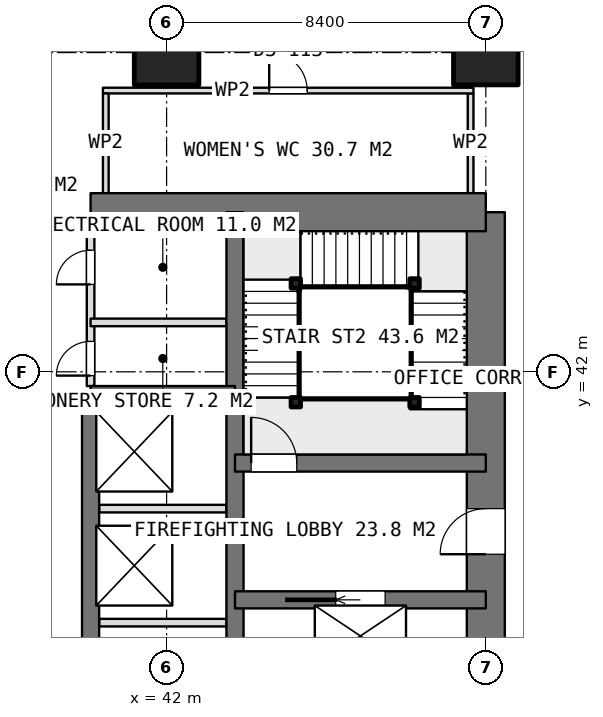
"""IFC4 building model, lengths in metres.
Left out: names, types, materials, properties, quantities, classifications, styles, units other than length and angle.
Written with IfcOpenShell. Run it as: python <this file> out.ifc"""

import sys

from ifc_helpers import new_model, si_unit, direction, frame, frame_2d, origin, origin_2d, place, context, subcontext, project, spatial, rectangle, extrude, element, fill, save


model = new_model("IFC4")
c1 = context("Model", 3, precision=1e-05, world=origin(), true_north=direction((0.0, 1.0)))
c2 = subcontext(c1, "Body", "Model", "MODEL_VIEW")
j1 = project(units=[si_unit("LENGTHUNIT", "METRE"), si_unit("PLANEANGLEUNIT", "RADIAN")], contexts=[c1])
p1 = place(None, origin())
s1 = spatial("IfcSite", under=j1, at=p1, CompositionType="ELEMENT")
p2 = place(p1, origin())
s2 = spatial("IfcBuilding", under=s1, at=p2, CompositionType="ELEMENT")
p3 = place(p2, frame((0.0, 0.0, 106.55)))
s3 = spatial("IfcBuildingStorey", under=s2, at=p3, CompositionType="ELEMENT", Elevation=106.55)
p4 = place(p3, frame((40.0, 46.2, 0.0), z_axis=(0.0, 0.0, 1.0), x_axis=(1.0, 0.0, 0.0)))
e1 = element("IfcWall", 1, at=p4, inside=s3, PredefinedType="SHEAR", context=c2, shape_type="SweptSolid", body=[
    extrude(rectangle(XDim=10.4, YDim=1.0, at=frame_2d((5.2, 0.0))), origin(), (0.0, 0.0, 1.0), 3.75),
])
p5 = place(p3, frame((50.4, 21.0, 0.0), z_axis=(0.0, 0.0, 1.0), x_axis=(0.0, 1.0, 0.0)))
e2 = element("IfcWall", 2, at=p5, inside=s3, PredefinedType="SHEAR", context=c2, shape_type="SweptSolid", body=[
    extrude(rectangle(XDim=25.2, YDim=1.0, at=frame_2d((12.6, 0.0))), origin(), (0.0, 0.0, 1.0), 3.75),
])
p6 = place(p5, frame((16.2, 0.0, 0.0)))
e3 = element("IfcOpeningElement", 3, at=p6, cuts=e2, PredefinedType="OPENING", context=c2, shape_type="SweptSolid", body=[
    extrude(rectangle(XDim=1.2, YDim=2.1, at=frame_2d((0.6, 1.05))), frame((0.0, 0.51, 0.0), z_axis=(0.0, -1.0, 0.0), x_axis=(1.0, 0.0, 0.0)), (0.0, 0.0, 1.0), 1.02),
])
p7 = place(p5, frame((10.05, 0.0, 0.0)))
e4 = element("IfcOpeningElement", 4, at=p7, cuts=e2, PredefinedType="OPENING", context=c2, shape_type="SweptSolid", body=[
    extrude(rectangle(XDim=0.9, YDim=2.1, at=frame_2d((0.45, 1.05))), frame((0.0, 0.51, 0.0), z_axis=(0.0, -1.0, 0.0), x_axis=(1.0, 0.0, 0.0)), (0.0, 0.0, 1.0), 1.02),
])
p8 = place(p5, frame((7.45, 0.0, 0.0)))
e5 = element("IfcOpeningElement", 5, at=p8, cuts=e2, PredefinedType="OPENING", context=c2, shape_type="SweptSolid", body=[
    extrude(rectangle(XDim=0.9, YDim=2.1, at=frame_2d((0.45, 1.05))), frame((0.0, 0.51, 0.0), z_axis=(0.0, -1.0, 0.0), x_axis=(1.0, 0.0, 0.0)), (0.0, 0.0, 1.0), 1.02),
])
p9 = place(p5, frame((0.7, 0.0, 0.0)))
e6 = element("IfcOpeningElement", 6, at=p9, cuts=e2, PredefinedType="OPENING", context=c2, shape_type="SweptSolid", body=[
    extrude(rectangle(XDim=1.2, YDim=2.1, at=frame_2d((0.6, 1.05))), frame((0.0, 0.51, 0.0), z_axis=(0.0, -1.0, 0.0), x_axis=(1.0, 0.0, 0.0)), (0.0, 0.0, 1.0), 1.02),
])
p10 = place(p3, frame((43.8, 21.0, 0.0), z_axis=(0.0, 0.0, 1.0), x_axis=(0.0, 1.0, 0.0)))
e7 = element("IfcWall", 7, at=p10, inside=s3, PredefinedType="SHEAR", context=c2, shape_type="SweptSolid", body=[
    extrude(rectangle(XDim=25.2, YDim=0.45, at=frame_2d((12.6, 0.0))), origin(), (0.0, 0.0, 1.0), 3.75),
])
p11 = place(p3, frame((40.0, 23.4, 0.0), z_axis=(0.0, 0.0, 1.0), x_axis=(0.0, 1.0, 0.0)))
e8 = element("IfcWall", 8, at=p11, inside=s3, PredefinedType="SHEAR", context=c2, shape_type="SweptSolid", body=[
    extrude(rectangle(XDim=18.0, YDim=0.45, at=frame_2d((9.0, 0.0))), origin(), (0.0, 0.0, 1.0), 3.75),
])
p12 = place(p11, frame((0.4, 0.0, 0.0)))
e9 = element("IfcOpeningElement", 9, at=p12, cuts=e8, PredefinedType="OPENING", context=c2, shape_type="SweptSolid", body=[
    extrude(rectangle(XDim=0.9, YDim=2.1, at=frame_2d((0.45, 1.05))), frame((0.0, 0.235, 0.0), z_axis=(0.0, -1.0, 0.0), x_axis=(1.0, 0.0, 0.0)), (0.0, 0.0, 1.0), 0.47),
])
p13 = place(p11, frame((3.35, 0.0, 0.0)))
e10 = element("IfcOpeningElement", 10, at=p13, cuts=e8, PredefinedType="OPENING", context=c2, shape_type="SweptSolid", body=[
    extrude(rectangle(XDim=1.0, YDim=2.1, at=frame_2d((0.5, 1.05))), frame((0.0, 0.235, 0.0), z_axis=(0.0, -1.0, 0.0), x_axis=(1.0, 0.0, 0.0)), (0.0, 0.0, 1.0), 0.47),
])
p14 = place(p3, frame((40.0, 41.4, 0.0), z_axis=(0.0, 0.0, 1.0), x_axis=(1.0, 0.0, 0.0)))
e11 = element("IfcWall", 11, at=p14, inside=s3, PredefinedType="SHEAR", context=c2, shape_type="SweptSolid", body=[
    extrude(rectangle(XDim=3.8, YDim=0.45, at=frame_2d((1.9, 0.0))), origin(), (0.0, 0.0, 1.0), 3.75),
])
p15 = place(p3, frame((43.8, 36.0, 0.0), z_axis=(0.0, 0.0, 1.0), x_axis=(1.0, 0.0, 0.0)))
e12 = element("IfcWall", 12, at=p15, inside=s3, PredefinedType="SHEAR", context=c2, shape_type="SweptSolid", body=[
    extrude(rectangle(XDim=6.6, YDim=0.45, at=frame_2d((3.3, 0.0))), origin(), (0.0, 0.0, 1.0), 3.75),
])
p16 = place(p15, frame((2.65, 0.0, 0.0)))
e13 = element("IfcOpeningElement", 13, at=p16, cuts=e12, PredefinedType="OPENING", context=c2, shape_type="SweptSolid", body=[
    extrude(rectangle(XDim=1.3, YDim=2.1, at=frame_2d((0.65, 1.05))), frame((0.0, 0.235, 0.0), z_axis=(0.0, -1.0, 0.0), x_axis=(1.0, 0.0, 0.0)), (0.0, 0.0, 1.0), 0.47),
])
p17 = place(p3, frame((43.8, 39.6, 0.0), z_axis=(0.0, 0.0, 1.0), x_axis=(1.0, 0.0, 0.0)))
e14 = element("IfcWall", 14, at=p17, inside=s3, PredefinedType="SHEAR", context=c2, shape_type="SweptSolid", body=[
    extrude(rectangle(XDim=6.6, YDim=0.45, at=frame_2d((3.3, 0.0))), origin(), (0.0, 0.0, 1.0), 3.75),
])
p18 = place(p17, frame((0.425, 0.0, 0.0)))
e15 = element("IfcOpeningElement", 15, at=p18, cuts=e14, PredefinedType="OPENING", context=c2, shape_type="SweptSolid", body=[
    extrude(rectangle(XDim=1.2, YDim=2.1, at=frame_2d((0.6, 1.05))), frame((0.0, 0.235, 0.0), z_axis=(0.0, -1.0, 0.0), x_axis=(1.0, 0.0, 0.0)), (0.0, 0.0, 1.0), 0.47),
])
for number, where, z_axis, x_axis in (
    (16, (42.0, 50.4, 0.0), (0.0, 0.0, 1.0), (1.0, 0.0, 0.0)),
    (17, (50.4, 50.4, 0.0), (0.0, 0.0, 1.0), (1.0, 0.0, 0.0)),
):
    element("IfcColumn", number, at=place(p3, frame(where, z_axis=z_axis, x_axis=x_axis)), inside=s3, PredefinedType="COLUMN", context=c2, shape_type="SweptSolid", body=[
        extrude(rectangle(XDim=1.7, YDim=1.7, at=origin_2d()), origin(), (0.0, 0.0, 1.0), 3.75),
    ])
for number, where, z_axis, x_axis in (
    (18, (40.225, 35.4, 0.0), (0.0, 0.0, 1.0), (1.0, 0.0, 0.0)),
    (19, (40.225, 38.4, 0.0), (0.0, 0.0, 1.0), (1.0, 0.0, 0.0)),
):
    element("IfcWall", number, at=place(p3, frame(where, z_axis=z_axis, x_axis=x_axis)), inside=s3, PredefinedType="PARTITIONING", context=c2, shape_type="SweptSolid", body=[
        extrude(rectangle(XDim=3.35, YDim=0.2, at=frame_2d((1.675, 0.0))), origin(), (0.0, 0.0, 1.0), 3.5),
    ])
p19 = place(p3, frame((40.0, 41.625, 0.0), z_axis=(0.0, 0.0, 1.0), x_axis=(0.0, 1.0, 0.0)))
e20 = element("IfcWall", 20, at=p19, inside=s3, PredefinedType="PARTITIONING", context=c2, shape_type="SweptSolid", body=[
    extrude(rectangle(XDim=4.075, YDim=0.2, at=frame_2d((2.038, 0.0))), origin(), (0.0, 0.0, 1.0), 3.5),
])
p20 = place(p19, frame((2.675, 0.0, 0.0)))
e21 = element("IfcOpeningElement", 21, at=p20, cuts=e20, PredefinedType="OPENING", context=c2, shape_type="SweptSolid", body=[
    extrude(rectangle(XDim=0.9, YDim=2.1, at=frame_2d((0.45, 1.05))), frame((0.0, 0.11, 0.0), z_axis=(0.0, -1.0, 0.0), x_axis=(1.0, 0.0, 0.0)), (0.0, 0.0, 1.0), 0.22),
])
p21 = place(p19, frame((0.275, 0.0, 0.0)))
e22 = element("IfcOpeningElement", 22, at=p21, cuts=e20, PredefinedType="OPENING", context=c2, shape_type="SweptSolid", body=[
    extrude(rectangle(XDim=0.9, YDim=2.1, at=frame_2d((0.45, 1.05))), frame((0.0, 0.11, 0.0), z_axis=(0.0, -1.0, 0.0), x_axis=(1.0, 0.0, 0.0)), (0.0, 0.0, 1.0), 0.22),
])
p22 = place(p3, frame((40.0, 43.3, 0.0), z_axis=(0.0, 0.0, 1.0), x_axis=(1.0, 0.0, 0.0)))
e23 = element("IfcWall", 23, at=p22, inside=s3, PredefinedType="PARTITIONING", context=c2, shape_type="SweptSolid", body=[
    extrude(rectangle(XDim=3.575, YDim=0.2, at=frame_2d((1.788, 0.0))), origin(), (0.0, 0.0, 1.0), 3.5),
])
p23 = place(p3, frame((40.325, 49.4, 0.0), z_axis=(0.0, 0.0, 1.0), x_axis=(1.0, 0.0, 0.0)))
e24 = element("IfcWall", 24, at=p23, inside=s3, PredefinedType="PARTITIONING", context=c2, shape_type="SweptSolid", body=[
    extrude(rectangle(XDim=9.75, YDim=0.15, at=frame_2d((4.875, 0.0))), origin(), (0.0, 0.0, 1.0), 3.5),
])
p24 = place(p23, frame((4.375, 0.0, 0.0)))
e25 = element("IfcOpeningElement", 25, at=p24, cuts=e24, PredefinedType="OPENING", context=c2, shape_type="SweptSolid", body=[
    extrude(rectangle(XDim=1.0, YDim=2.1, at=frame_2d((0.5, 1.05))), frame((0.0, 0.085, 0.0), z_axis=(0.0, -1.0, 0.0), x_axis=(1.0, 0.0, 0.0)), (0.0, 0.0, 1.0), 0.17),
])
for number, where, z_axis, x_axis in (
    (26, (40.4, 46.7, 0.0), (0.0, 0.0, 1.0), (0.0, 1.0, 0.0)),
    (27, (50.0, 46.7, 0.0), (0.0, 0.0, 1.0), (0.0, 1.0, 0.0)),
):
    element("IfcWall", number, at=place(p3, frame(where, z_axis=z_axis, x_axis=x_axis)), inside=s3, PredefinedType="PARTITIONING", context=c2, shape_type="SweptSolid", body=[
        extrude(rectangle(XDim=2.625, YDim=0.15, at=frame_2d((1.312, 0.0))), origin(), (0.0, 0.0, 1.0), 3.5),
    ])
for number, where, z_axis, x_axis in (
    (28, (45.4, 41.2, 0.0), (0.0, 0.0, 1.0), (1.0, 0.0, 0.0)),
    (29, (45.4, 44.325, 0.0), (0.0, 0.0, 1.0), (1.0, 0.0, 0.0)),
    (30, (48.525, 44.325, 0.0), (0.0, 0.0, 1.0), (1.0, 0.0, 0.0)),
    (31, (48.525, 41.2, 0.0), (0.0, 0.0, 1.0), (1.0, 0.0, 0.0)),
):
    element("IfcColumn", number, at=place(p3, frame(where, z_axis=z_axis, x_axis=x_axis)), inside=s3, PredefinedType="COLUMN", context=c2, shape_type="SweptSolid", body=[
        extrude(rectangle(XDim=0.25, YDim=0.25, at=origin_2d()), origin(), (0.0, 0.0, 1.0), 3.75),
    ])
p25 = place(p6, origin())
e32 = element("IfcDoor", 32, at=p25, inside=s3, OperationType="SINGLE_SWING_LEFT", PredefinedType="DOOR", context=c2, shape_type="SweptSolid", body=[
    extrude(rectangle(XDim=1.2, YDim=2.1, at=frame_2d((0.6, 1.05))), frame((0.0, 0.025, 0.0), z_axis=(0.0, -1.0, 0.0), x_axis=(1.0, 0.0, 0.0)), (0.0, 0.0, 1.0), 0.05),
])
fill(e3, e32)
p26 = place(p20, origin())
e33 = element("IfcDoor", 33, at=p26, inside=s3, OperationType="SINGLE_SWING_LEFT", PredefinedType="DOOR", context=c2, shape_type="SweptSolid", body=[
    extrude(rectangle(XDim=0.9, YDim=2.1, at=frame_2d((0.45, 1.05))), frame((0.0, 0.025, 0.0), z_axis=(0.0, -1.0, 0.0), x_axis=(1.0, 0.0, 0.0)), (0.0, 0.0, 1.0), 0.05),
])
fill(e21, e33)
p27 = place(p21, origin())
e34 = element("IfcDoor", 34, at=p27, inside=s3, OperationType="SINGLE_SWING_LEFT", PredefinedType="DOOR", context=c2, shape_type="SweptSolid", body=[
    extrude(rectangle(XDim=0.9, YDim=2.1, at=frame_2d((0.45, 1.05))), frame((0.0, 0.025, 0.0), z_axis=(0.0, -1.0, 0.0), x_axis=(1.0, 0.0, 0.0)), (0.0, 0.0, 1.0), 0.05),
])
fill(e22, e34)
p28 = place(p16, origin())
e35 = element("IfcDoor", 35, at=p28, inside=s3, OperationType="SLIDING_TO_LEFT", PredefinedType="USERDEFINED", context=c2, shape_type="SweptSolid", body=[
    extrude(rectangle(XDim=1.3, YDim=2.1, at=frame_2d((0.65, 1.05))), frame((0.0, 0.025, 0.0), z_axis=(0.0, -1.0, 0.0), x_axis=(1.0, 0.0, 0.0)), (0.0, 0.0, 1.0), 0.05),
])
fill(e13, e35)
p29 = place(p24, origin())
e36 = element("IfcDoor", 36, at=p29, inside=s3, OperationType="SINGLE_SWING_LEFT", PredefinedType="DOOR", context=c2, shape_type="SweptSolid", body=[
    extrude(rectangle(XDim=1.0, YDim=2.1, at=frame_2d((0.5, 1.05))), frame((0.0, 0.025, 0.0), z_axis=(0.0, -1.0, 0.0), x_axis=(1.0, 0.0, 0.0)), (0.0, 0.0, 1.0), 0.05),
])
fill(e25, e36)
p30 = place(p18, origin())
e37 = element("IfcDoor", 37, at=p30, inside=s3, OperationType="SINGLE_SWING_RIGHT", PredefinedType="DOOR", context=c2, shape_type="SweptSolid", body=[
    extrude(rectangle(XDim=1.2, YDim=2.1, at=frame_2d((0.6, 1.05))), frame((0.0, 0.025, 0.0), z_axis=(0.0, -1.0, 0.0), x_axis=(1.0, 0.0, 0.0)), (0.0, 0.0, 1.0), 0.05),
])
fill(e15, e37)
save(model, sys.argv[1])
